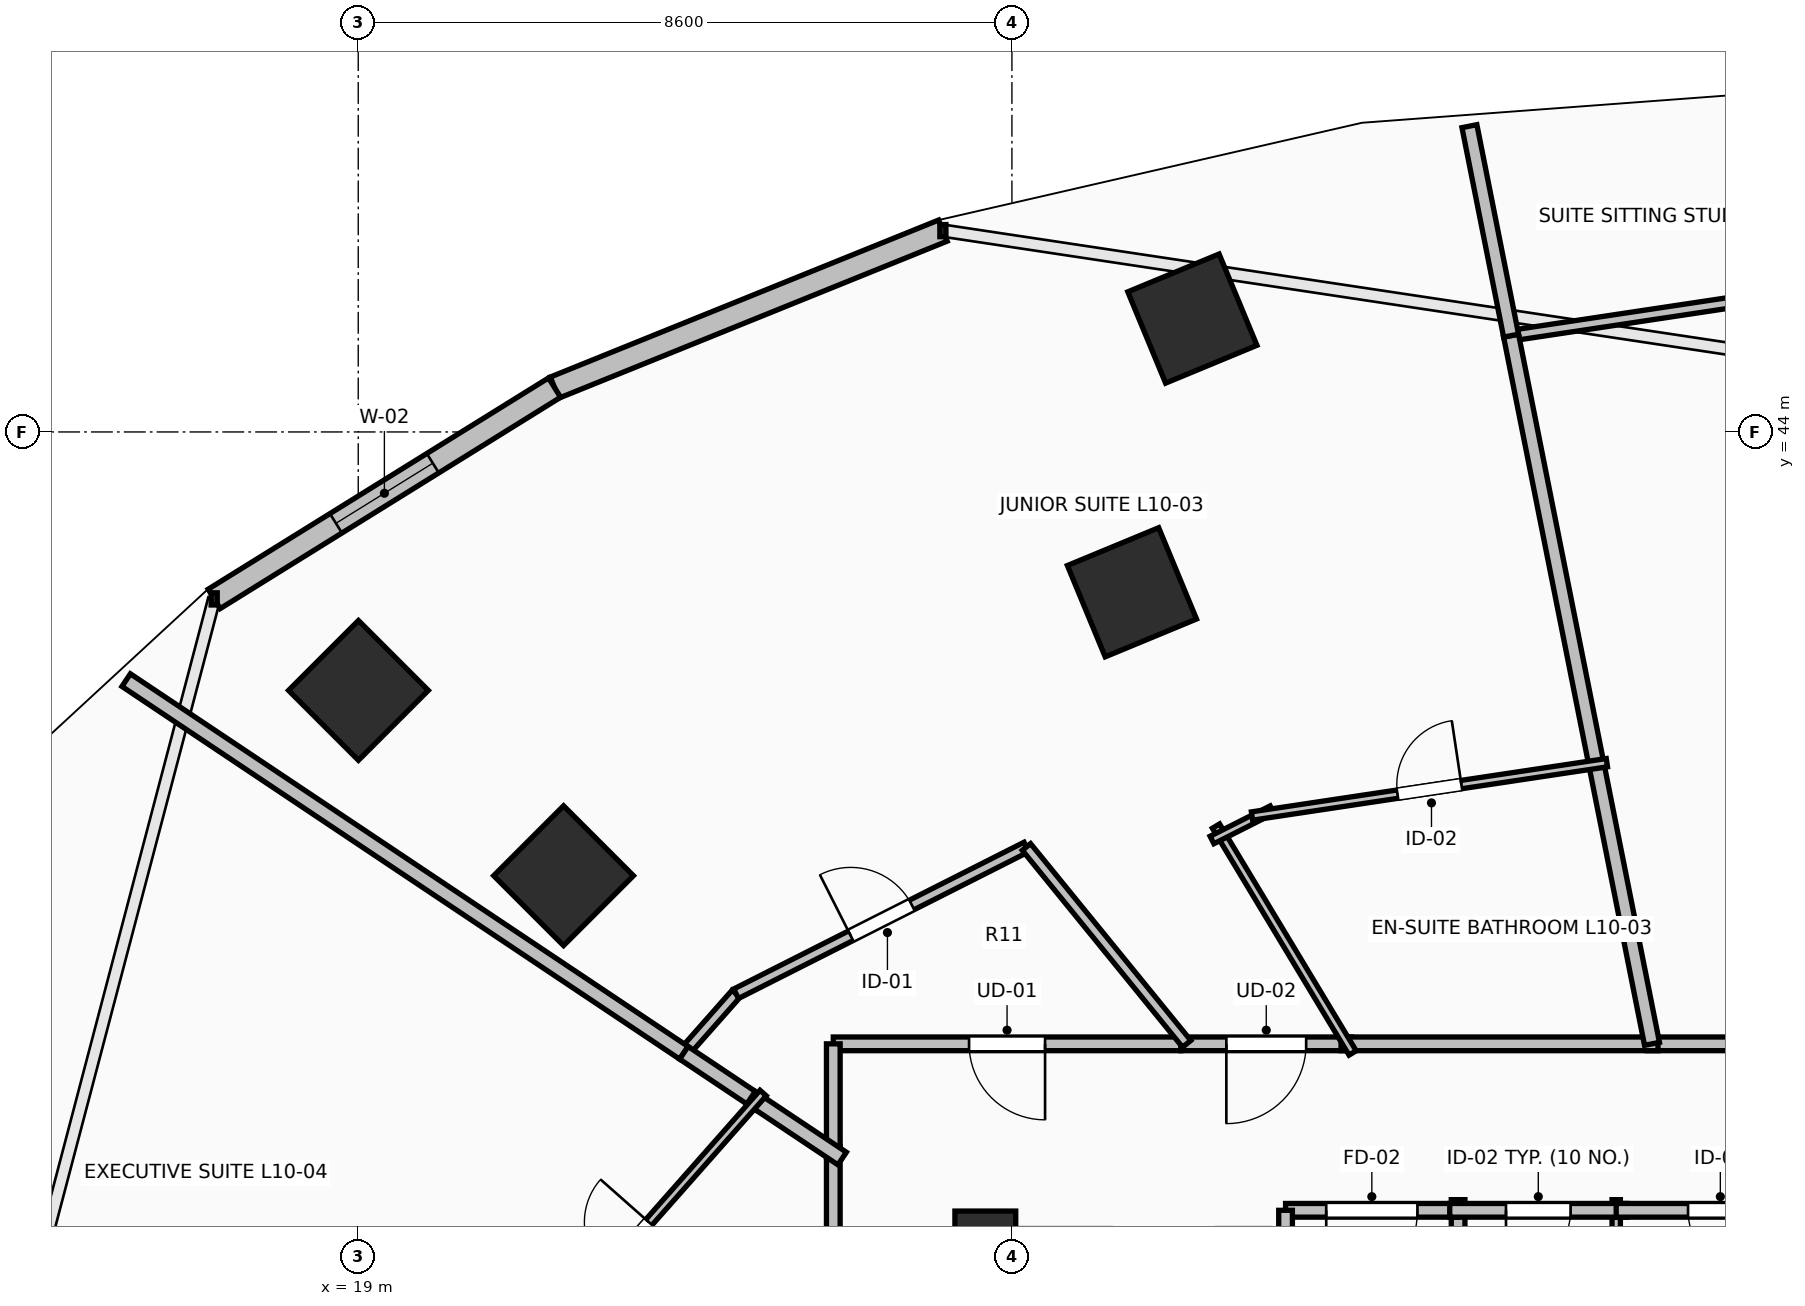
"""IFC4 building model, lengths in metres.
Left out: names, types, materials, properties, quantities, classifications, styles, units other than length and angle.
Written with IfcOpenShell. Run it as: python <this file> out.ifc"""

import sys

from ifc_helpers import new_model, si_unit, direction, frame, frame_2d, origin, origin_2d, place, context, subcontext, project, spatial, rectangle, extrude, element, fill, save


model = new_model("IFC4")
c1 = context("Model", 3, precision=1e-05, world=origin(), true_north=direction((0.0, 1.0)))
c2 = subcontext(c1, "Body", "Model", "MODEL_VIEW")
j1 = project(units=[si_unit("LENGTHUNIT", "METRE"), si_unit("PLANEANGLEUNIT", "RADIAN")], contexts=[c1])
p1 = place(None, origin())
s1 = spatial("IfcSite", under=j1, at=p1, CompositionType="ELEMENT")
p2 = place(p1, origin())
s2 = spatial("IfcBuilding", under=s1, at=p2, CompositionType="ELEMENT")
p3 = place(p2, frame((0.0, 0.0, 41.5)))
s3 = spatial("IfcBuildingStorey", under=s2, at=p3, CompositionType="ELEMENT", Elevation=41.5)
for number, where, z_axis, x_axis in (
    (1, (29.179, 41.891, 0.0), (0.0, 0.0, 1.0), (-0.383, 0.924, 0.0)),
    (2, (21.701, 38.162, 0.0), (0.0, 0.0, 1.0), (-0.707, 0.707, 0.0)),
    (3, (29.974, 45.492, 0.0), (0.0, 0.0, 1.0), (-0.383, 0.924, 0.0)),
    (4, (19.003, 40.6, 0.0), (0.0, 0.0, 1.0), (-0.707, 0.707, 0.0)),
):
    element("IfcColumn", number, at=place(p3, frame(where, z_axis=z_axis, x_axis=x_axis)), inside=s3, PredefinedType="COLUMN", context=c2, shape_type="SweptSolid", body=[
        extrude(rectangle(XDim=1.3, YDim=1.3, at=origin_2d()), origin(), (0.0, 0.0, 1.0), 3.5),
    ])
p4 = place(p3, frame((27.25, 33.15, 0.0), z_axis=(0.0, 0.0, 1.0), x_axis=(1.0, 0.0, 0.0)))
e5 = element("IfcColumn", 5, at=p4, inside=s3, PredefinedType="PILASTER", context=c2, shape_type="SweptSolid", body=[
    extrude(rectangle(XDim=0.8, YDim=1.2, at=origin_2d()), origin(), (0.0, 0.0, 1.0), 3.5),
])
p5 = place(p3, frame((26.692, 46.649, 0.0), z_axis=(0.0, 0.0, 1.0), x_axis=(-0.927095325176, -0.374825636845, 0.0)))
e6 = element("IfcWall", 6, at=p5, inside=s3, PredefinedType="STANDARD", context=c2, shape_type="SweptSolid", body=[
    extrude(rectangle(XDim=5.51, YDim=0.3, at=frame_2d((2.755, 0.0))), origin(), (0.0, 0.0, 1.0), 3.24),
])
p6 = place(p3, frame((21.583, 44.583, 0.0), z_axis=(0.0, 0.0, 1.0), x_axis=(-0.849633724826, -0.527373239404, 0.0)))
e7 = element("IfcWall", 7, at=p6, inside=s3, PredefinedType="STANDARD", context=c2, shape_type="SweptSolid", body=[
    extrude(rectangle(XDim=5.271, YDim=0.3, at=frame_2d((2.635, 0.0))), origin(), (0.0, 0.0, 1.0), 3.24),
])
p7 = place(p6, frame((1.885, 0.0, 0.85)))
e8 = element("IfcOpeningElement", 8, at=p7, cuts=e7, PredefinedType="OPENING", context=c2, shape_type="SweptSolid", body=[
    extrude(rectangle(XDim=1.5, YDim=2.19, at=frame_2d((0.75, 1.095))), frame((0.0, 0.165, 0.0), z_axis=(0.0, -1.0, 0.0), x_axis=(1.0, 0.0, 0.0)), (0.0, 0.0, 1.0), 0.33),
])
p8 = place(p3, frame((33.47, 30.34, 0.0), z_axis=(0.0, 0.0, 1.0), x_axis=(0.0, 1.0, 0.0)))
e9 = element("IfcWall", 9, at=p8, inside=s3, PredefinedType="PARTITIONING", context=c2, shape_type="SweptSolid", body=[
    extrude(rectangle(XDim=3.56, YDim=0.18, at=frame_2d((1.78, 0.0))), origin(), (0.0, 0.0, 1.0), 3.24),
])
p9 = place(p3, frame((33.47, 33.76, 0.0), z_axis=(0.0, 0.0, 1.0), x_axis=(-1.0, 0.0, 0.0)))
e10 = element("IfcWall", 10, at=p9, inside=s3, PredefinedType="PARTITIONING", context=c2, shape_type="SweptSolid", body=[
    extrude(rectangle(XDim=2.27, YDim=0.18, at=frame_2d((1.135, 0.0))), origin(), (0.0, 0.0, 1.0), 3.24),
])
p10 = place(p9, frame((0.535, 0.0, 0.0)))
e11 = element("IfcOpeningElement", 11, at=p10, cuts=e10, PredefinedType="OPENING", context=c2, shape_type="SweptSolid", body=[
    extrude(rectangle(XDim=1.2, YDim=2.15, at=frame_2d((0.6, 1.075))), frame((0.0, 0.105, 0.0), z_axis=(0.0, -1.0, 0.0), x_axis=(1.0, 0.0, 0.0)), (0.0, 0.0, 1.0), 0.21),
])
p11 = place(p3, frame((31.2, 33.76, 0.0), z_axis=(0.0, 0.0, 1.0), x_axis=(0.0, -1.0, 0.0)))
e12 = element("IfcWall", 12, at=p11, inside=s3, PredefinedType="PARTITIONING", context=c2, shape_type="SweptSolid", body=[
    extrude(rectangle(XDim=0.56, YDim=0.18, at=frame_2d((0.28, 0.0))), origin(), (0.0, 0.0, 1.0), 3.24),
])
p12 = place(p3, frame((35.55, 30.34, 0.0), z_axis=(0.0, 0.0, 1.0), x_axis=(0.0, 1.0, 0.0)))
e13 = element("IfcWall", 13, at=p12, inside=s3, PredefinedType="PARTITIONING", context=c2, shape_type="SweptSolid", body=[
    extrude(rectangle(XDim=3.56, YDim=0.11, at=frame_2d((1.78, 0.0))), origin(), (0.0, 0.0, 1.0), 2.432),
])
p13 = place(p3, frame((35.69, 33.76, 0.0), z_axis=(0.0, 0.0, 1.0), x_axis=(-1.0, 0.0, 0.0)))
e14 = element("IfcWall", 14, at=p13, inside=s3, PredefinedType="PARTITIONING", context=c2, shape_type="SweptSolid", body=[
    extrude(rectangle(XDim=2.33, YDim=0.18, at=frame_2d((1.165, 0.0))), origin(), (0.0, 0.0, 1.0), 3.24),
])
p14 = place(p13, frame((0.74, 0.0, 0.0)))
e15 = element("IfcOpeningElement", 15, at=p14, cuts=e14, PredefinedType="OPENING", context=c2, shape_type="SweptSolid", body=[
    extrude(rectangle(XDim=0.85, YDim=2.1, at=frame_2d((0.425, 1.05))), frame((0.0, 0.105, 0.0), z_axis=(0.0, -1.0, 0.0), x_axis=(1.0, 0.0, 0.0)), (0.0, 0.0, 1.0), 0.21),
])
p15 = place(p3, frame((38.29, 33.76, 0.0), z_axis=(0.0, 0.0, 1.0), x_axis=(-1.0, 0.0, 0.0)))
e16 = element("IfcWall", 16, at=p15, inside=s3, PredefinedType="PARTITIONING", context=c2, shape_type="SweptSolid", body=[
    extrude(rectangle(XDim=2.74, YDim=0.18, at=frame_2d((1.37, 0.0))), origin(), (0.0, 0.0, 1.0), 3.24),
])
p16 = place(p15, frame((0.945, 0.0, 0.0)))
e17 = element("IfcOpeningElement", 17, at=p16, cuts=e16, PredefinedType="OPENING", context=c2, shape_type="SweptSolid", body=[
    extrude(rectangle(XDim=0.85, YDim=2.1, at=frame_2d((0.425, 1.05))), frame((0.0, 0.105, 0.0), z_axis=(0.0, -1.0, 0.0), x_axis=(1.0, 0.0, 0.0)), (0.0, 0.0, 1.0), 0.21),
])
p17 = place(p3, frame((40.534, 35.95, 0.0), z_axis=(0.0, 0.0, 1.0), x_axis=(-1.0, 0.0, 0.0)))
e18 = element("IfcWall", 18, at=p17, inside=s3, PredefinedType="PARTITIONING", context=c2, shape_type="SweptSolid", body=[
    extrude(rectangle(XDim=4.574, YDim=0.18, at=frame_2d((2.287, 0.0))), origin(), (0.0, 0.0, 1.0), 3.24),
])
p18 = place(p17, frame((1.762, 0.0, 0.0)))
e19 = element("IfcOpeningElement", 19, at=p18, cuts=e18, PredefinedType="OPENING", context=c2, shape_type="SweptSolid", body=[
    extrude(rectangle(XDim=1.05, YDim=2.2, at=frame_2d((0.525, 1.1))), frame((0.0, 0.105, 0.0), z_axis=(0.0, -1.0, 0.0), x_axis=(1.0, 0.0, 0.0)), (0.0, 0.0, 1.0), 0.21),
])
p19 = place(p3, frame((32.07, 35.95, 0.0), z_axis=(0.0, 0.0, 1.0), x_axis=(-1.0, 0.0, 0.0)))
e20 = element("IfcWall", 20, at=p19, inside=s3, PredefinedType="PARTITIONING", context=c2, shape_type="SweptSolid", body=[
    extrude(rectangle(XDim=2.248, YDim=0.18, at=frame_2d((1.124, 0.0))), origin(), (0.0, 0.0, 1.0), 2.432),
])
p20 = place(p19, frame((0.599, 0.0, 0.0)))
e21 = element("IfcOpeningElement", 21, at=p20, cuts=e20, PredefinedType="OPENING", context=c2, shape_type="SweptSolid", body=[
    extrude(rectangle(XDim=1.05, YDim=2.2, at=frame_2d((0.525, 1.1))), frame((0.0, 0.105, 0.0), z_axis=(0.0, -1.0, 0.0), x_axis=(1.0, 0.0, 0.0)), (0.0, 0.0, 1.0), 0.21),
])
p21 = place(p3, frame((36.1, 35.95, 0.0), z_axis=(0.0, 0.0, 1.0), x_axis=(-1.0, 0.0, 0.0)))
e22 = element("IfcWall", 22, at=p21, inside=s3, PredefinedType="PARTITIONING", context=c2, shape_type="SweptSolid", body=[
    extrude(rectangle(XDim=4.17, YDim=0.18, at=frame_2d((2.085, 0.0))), origin(), (0.0, 0.0, 1.0), 3.24),
])
p22 = place(p3, frame((29.822, 35.95, 0.0), z_axis=(0.0, 0.0, 1.0), x_axis=(-1.0, 0.0, 0.0)))
e23 = element("IfcWall", 23, at=p22, inside=s3, PredefinedType="PARTITIONING", context=c2, shape_type="SweptSolid", body=[
    extrude(rectangle(XDim=4.572, YDim=0.18, at=frame_2d((2.286, 0.0))), origin(), (0.0, 0.0, 1.0), 2.432),
])
p23 = place(p22, frame((1.786, 0.0, 0.0)))
e24 = element("IfcOpeningElement", 24, at=p23, cuts=e23, PredefinedType="OPENING", context=c2, shape_type="SweptSolid", body=[
    extrude(rectangle(XDim=1.0, YDim=2.15, at=frame_2d((0.5, 1.075))), frame((0.0, 0.105, 0.0), z_axis=(0.0, -1.0, 0.0), x_axis=(1.0, 0.0, 0.0)), (0.0, 0.0, 1.0), 0.21),
])
p24 = place(p3, frame((25.25, 35.95, 0.0), z_axis=(0.0, 0.0, 1.0), x_axis=(0.0, -1.0, 0.0)))
e25 = element("IfcWall", 25, at=p24, inside=s3, PredefinedType="PARTITIONING", context=c2, shape_type="SweptSolid", body=[
    extrude(rectangle(XDim=1.491, YDim=0.18, at=frame_2d((0.746, 0.0))), origin(), (0.0, 0.0, 1.0), 2.432),
])
p25 = place(p3, frame((25.25, 34.599, 0.0), z_axis=(0.0, 0.0, 1.0), x_axis=(0.0, -1.0, 0.0)))
e26 = element("IfcWall", 26, at=p25, inside=s3, PredefinedType="PARTITIONING", context=c2, shape_type="SweptSolid", body=[
    extrude(rectangle(XDim=5.51, YDim=0.18, at=frame_2d((2.755, 0.0))), origin(), (0.0, 0.0, 1.0), 2.432),
])
p26 = place(p3, frame((38.0, 45.844, 0.0), z_axis=(0.0, 0.0, 1.0), x_axis=(-0.988862311426, -0.148833225599, 0.0)))
e27 = element("IfcWall", 27, at=p26, inside=s3, PredefinedType="PARTITIONING", context=c2, shape_type="SweptSolid", body=[
    extrude(rectangle(XDim=3.876, YDim=0.14, at=frame_2d((1.938, 0.0))), origin(), (0.0, 0.0, 1.0), 2.624),
])
p27 = place(p3, frame((34.167, 45.267, 0.0), z_axis=(0.0, 0.0, 1.0), x_axis=(0.19516219459, -0.980770981322, 0.0)))
e28 = element("IfcWall", 28, at=p27, inside=s3, PredefinedType="PARTITIONING", context=c2, shape_type="SweptSolid", body=[
    extrude(rectangle(XDim=9.5, YDim=0.2, at=frame_2d((4.75, 0.0))), origin(), (0.0, 0.0, 1.0), 2.432),
])
p28 = place(p3, frame((33.619, 48.023, 0.0), z_axis=(0.0, 0.0, 1.0), x_axis=(0.195063341769, -0.980790646722, 0.0)))
e29 = element("IfcWall", 29, at=p28, inside=s3, PredefinedType="PARTITIONING", context=c2, shape_type="SweptSolid", body=[
    extrude(rectangle(XDim=2.81, YDim=0.2, at=frame_2d((1.405, 0.0))), origin(), (0.0, 0.0, 1.0), 2.624),
])
p29 = place(p3, frame((32.082, 35.83, 0.0), z_axis=(0.0, 0.0, 1.0), x_axis=(-0.51585529038, 0.856675737597, 0.0)))
e30 = element("IfcWall", 30, at=p29, inside=s3, PredefinedType="PARTITIONING", context=c2, shape_type="SweptSolid", body=[
    extrude(rectangle(XDim=3.484, YDim=0.11, at=frame_2d((1.742, 0.0))), origin(), (0.0, 0.0, 1.0), 2.432),
])
p30 = place(p3, frame((30.232, 38.632, 0.0), z_axis=(0.0, 0.0, 1.0), x_axis=(0.892376579336, 0.451291525129, 0.0)))
e31 = element("IfcWall", 31, at=p30, inside=s3, PredefinedType="PARTITIONING", context=c2, shape_type="SweptSolid", body=[
    extrude(rectangle(XDim=0.885, YDim=0.11, at=frame_2d((0.442, 0.0))), origin(), (0.0, 0.0, 1.0), 3.24),
])
p31 = place(p3, frame((30.759, 38.947, 0.0), z_axis=(0.0, 0.0, 1.0), x_axis=(0.9889029502, 0.148562966739, 0.0)))
e32 = element("IfcWall", 32, at=p31, inside=s3, PredefinedType="PARTITIONING", context=c2, shape_type="SweptSolid", body=[
    extrude(rectangle(XDim=4.721, YDim=0.11, at=frame_2d((2.361, 0.0))), origin(), (0.0, 0.0, 1.0), 2.432),
])
p32 = place(p31, frame((1.936, 0.0, 0.0)))
e33 = element("IfcOpeningElement", 33, at=p32, cuts=e32, PredefinedType="OPENING", context=c2, shape_type="SweptSolid", body=[
    extrude(rectangle(XDim=0.85, YDim=2.1, at=frame_2d((0.425, 1.05))), frame((0.0, 0.07, 0.0), z_axis=(0.0, -1.0, 0.0), x_axis=(1.0, 0.0, 0.0)), (0.0, 0.0, 1.0), 0.14),
])
p33 = place(p3, frame((23.284, 35.832, 0.0), z_axis=(0.0, 0.0, 1.0), x_axis=(0.662462125237, 0.749095409561, 0.0)))
e34 = element("IfcWall", 34, at=p33, inside=s3, PredefinedType="PARTITIONING", context=c2, shape_type="SweptSolid", body=[
    extrude(rectangle(XDim=1.037, YDim=0.14, at=frame_2d((0.519, 0.0))), origin(), (0.0, 0.0, 1.0), 2.432),
])
p34 = place(p3, frame((23.971, 36.609, 0.0), z_axis=(0.0, 0.0, 1.0), x_axis=(0.892445030909, 0.451156144596, 0.0)))
e35 = element("IfcWall", 35, at=p34, inside=s3, PredefinedType="PARTITIONING", context=c2, shape_type="SweptSolid", body=[
    extrude(rectangle(XDim=4.281, YDim=0.14, at=frame_2d((2.14, 0.0))), origin(), (0.0, 0.0, 1.0), 3.24),
])
p35 = place(p34, frame((1.69, 0.0, 0.0)))
e36 = element("IfcOpeningElement", 36, at=p35, cuts=e35, PredefinedType="OPENING", context=c2, shape_type="SweptSolid", body=[
    extrude(rectangle(XDim=0.9, YDim=2.1, at=frame_2d((0.45, 1.05))), frame((0.0, 0.085, 0.0), z_axis=(0.0, -1.0, 0.0), x_axis=(1.0, 0.0, 0.0)), (0.0, 0.0, 1.0), 0.17),
])
p36 = place(p3, frame((27.791, 38.54, 0.0), z_axis=(0.0, 0.0, 1.0), x_axis=(0.631217195835, -0.775606118904, 0.0)))
e37 = element("IfcWall", 37, at=p36, inside=s3, PredefinedType="PARTITIONING", context=c2, shape_type="SweptSolid", body=[
    extrude(rectangle(XDim=3.339, YDim=0.14, at=frame_2d((1.67, 0.0))), origin(), (0.0, 0.0, 1.0), 2.432),
])
p37 = place(p3, frame((15.947, 40.735, 0.0), z_axis=(0.0, 0.0, 1.0), x_axis=(0.831432604336, -0.555625615363, 0.0)))
e38 = element("IfcWall", 38, at=p37, inside=s3, PredefinedType="PARTITIONING", context=c2, shape_type="SweptSolid", body=[
    extrude(rectangle(XDim=8.824, YDim=0.2, at=frame_2d((4.412, 0.0))), origin(), (0.0, 0.0, 1.0), 2.624),
])
p38 = place(p3, frame((23.284, 35.832, 0.0), z_axis=(0.0, 0.0, 1.0), x_axis=(0.831550226979, -0.555449565677, 0.0)))
e39 = element("IfcWall", 39, at=p38, inside=s3, PredefinedType="PARTITIONING", context=c2, shape_type="SweptSolid", body=[
    extrude(rectangle(XDim=1.203, YDim=0.2, at=frame_2d((0.601, 0.0))), origin(), (0.0, 0.0, 1.0), 2.972),
])
p39 = place(p3, frame((24.167, 35.241, 0.0), z_axis=(0.0, 0.0, 1.0), x_axis=(0.831815696492, -0.555051931868, 0.0)))
e40 = element("IfcWall", 40, at=p39, inside=s3, PredefinedType="PARTITIONING", context=c2, shape_type="SweptSolid", body=[
    extrude(rectangle(XDim=1.441, YDim=0.2, at=frame_2d((0.721, 0.0))), origin(), (0.0, 0.0, 1.0), 2.972),
])
p40 = place(p3, frame((20.76, 31.266, 0.0), z_axis=(0.0, 0.0, 1.0), x_axis=(0.662087707802, 0.749426358742, 0.0)))
e41 = element("IfcWall", 41, at=p40, inside=s3, PredefinedType="PARTITIONING", context=c2, shape_type="SweptSolid", body=[
    extrude(rectangle(XDim=5.387, YDim=0.11, at=frame_2d((2.693, 0.0))), origin(), (0.0, 0.0, 1.0), 2.972),
])
p41 = place(p40, frame((2.268, 0.0, 0.0)))
e42 = element("IfcOpeningElement", 42, at=p41, cuts=e41, PredefinedType="OPENING", context=c2, shape_type="SweptSolid", body=[
    extrude(rectangle(XDim=0.85, YDim=2.1, at=frame_2d((0.425, 1.05))), frame((0.0, 0.07, 0.0), z_axis=(0.0, -1.0, 0.0), x_axis=(1.0, 0.0, 0.0)), (0.0, 0.0, 1.0), 0.14),
])
p42 = place(p7, origin())
e43 = element("IfcWindow", 43, at=p42, inside=s3, PartitioningType="SINGLE_PANEL", PredefinedType="WINDOW", context=c2, shape_type="SweptSolid", body=[
    extrude(rectangle(XDim=1.5, YDim=2.19, at=frame_2d((0.75, 1.095))), frame((0.0, 0.03, 0.0), z_axis=(0.0, -1.0, 0.0), x_axis=(1.0, 0.0, 0.0)), (0.0, 0.0, 1.0), 0.06),
])
fill(e8, e43)
p43 = place(p10, origin())
e44 = element("IfcDoor", 44, at=p43, inside=s3, OperationType="SINGLE_SWING_RIGHT", PredefinedType="DOOR", context=c2, shape_type="SweptSolid", body=[
    extrude(rectangle(XDim=1.2, YDim=2.15, at=frame_2d((0.6, 1.075))), frame((0.0, 0.025, 0.0), z_axis=(0.0, -1.0, 0.0), x_axis=(1.0, 0.0, 0.0)), (0.0, 0.0, 1.0), 0.05),
])
fill(e11, e44)
p44 = place(p14, origin())
e45 = element("IfcDoor", 45, at=p44, inside=s3, OperationType="SINGLE_SWING_RIGHT", PredefinedType="DOOR", context=c2, shape_type="SweptSolid", body=[
    extrude(rectangle(XDim=0.85, YDim=2.1, at=frame_2d((0.425, 1.05))), frame((0.0, 0.025, 0.0), z_axis=(0.0, -1.0, 0.0), x_axis=(1.0, 0.0, 0.0)), (0.0, 0.0, 1.0), 0.05),
])
fill(e15, e45)
p45 = place(p16, origin())
e46 = element("IfcDoor", 46, at=p45, inside=s3, OperationType="SINGLE_SWING_LEFT", PredefinedType="DOOR", context=c2, shape_type="SweptSolid", body=[
    extrude(rectangle(XDim=0.85, YDim=2.1, at=frame_2d((0.425, 1.05))), frame((0.0, 0.025, 0.0), z_axis=(0.0, -1.0, 0.0), x_axis=(1.0, 0.0, 0.0)), (0.0, 0.0, 1.0), 0.05),
])
fill(e17, e46)
p46 = place(p20, origin())
e47 = element("IfcDoor", 47, at=p46, inside=s3, OperationType="SINGLE_SWING_RIGHT", PredefinedType="DOOR", context=c2, shape_type="SweptSolid", body=[
    extrude(rectangle(XDim=1.05, YDim=2.2, at=frame_2d((0.525, 1.1))), frame((0.0, 0.025, 0.0), z_axis=(0.0, -1.0, 0.0), x_axis=(1.0, 0.0, 0.0)), (0.0, 0.0, 1.0), 0.05),
])
fill(e21, e47)
p47 = place(p23, origin())
e48 = element("IfcDoor", 48, at=p47, inside=s3, OperationType="SINGLE_SWING_LEFT", PredefinedType="DOOR", context=c2, shape_type="SweptSolid", body=[
    extrude(rectangle(XDim=1.0, YDim=2.15, at=frame_2d((0.5, 1.075))), frame((0.0, 0.025, 0.0), z_axis=(0.0, -1.0, 0.0), x_axis=(1.0, 0.0, 0.0)), (0.0, 0.0, 1.0), 0.05),
])
fill(e24, e48)
p48 = place(p32, origin())
e49 = element("IfcDoor", 49, at=p48, inside=s3, OperationType="SINGLE_SWING_RIGHT", PredefinedType="DOOR", context=c2, shape_type="SweptSolid", body=[
    extrude(rectangle(XDim=0.85, YDim=2.1, at=frame_2d((0.425, 1.05))), frame((0.0, 0.025, 0.0), z_axis=(0.0, -1.0, 0.0), x_axis=(1.0, 0.0, 0.0)), (0.0, 0.0, 1.0), 0.05),
])
fill(e33, e49)
p49 = place(p35, origin())
e50 = element("IfcDoor", 50, at=p49, inside=s3, OperationType="SINGLE_SWING_LEFT", PredefinedType="DOOR", context=c2, shape_type="SweptSolid", body=[
    extrude(rectangle(XDim=0.9, YDim=2.1, at=frame_2d((0.45, 1.05))), frame((0.0, 0.025, 0.0), z_axis=(0.0, -1.0, 0.0), x_axis=(1.0, 0.0, 0.0)), (0.0, 0.0, 1.0), 0.05),
])
fill(e36, e50)
p50 = place(p41, origin())
e51 = element("IfcDoor", 51, at=p50, inside=s3, OperationType="SINGLE_SWING_RIGHT", PredefinedType="DOOR", context=c2, shape_type="SweptSolid", body=[
    extrude(rectangle(XDim=0.85, YDim=2.1, at=frame_2d((0.425, 1.05))), frame((0.0, 0.025, 0.0), z_axis=(0.0, -1.0, 0.0), x_axis=(1.0, 0.0, 0.0)), (0.0, 0.0, 1.0), 0.05),
])
fill(e42, e51)
save(model, sys.argv[1])
